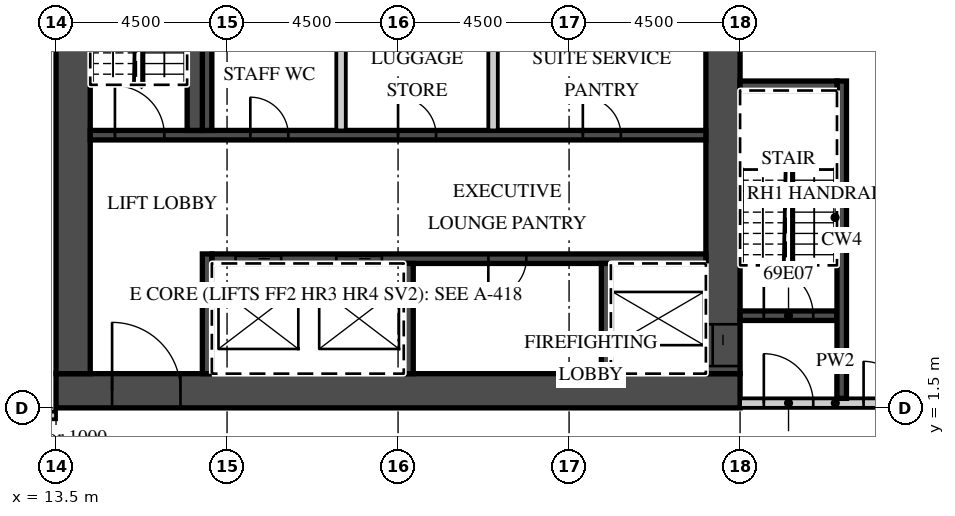
"""IFC4 building model, lengths in metres.
Left out: names, types, materials, properties, quantities, classifications, styles, units other than length and angle.
Written with IfcOpenShell. Run it as: python <this file> out.ifc"""

import sys

from ifc_helpers import new_model, si_unit, direction, frame, frame_2d, origin, place, context, subcontext, project, spatial, rectangle, extrude, element, fill, save


model = new_model("IFC4")
c1 = context("Model", 3, precision=1e-05, world=origin(), true_north=direction((0.0, 1.0)))
c2 = subcontext(c1, "Body", "Model", "MODEL_VIEW")
j1 = project(units=[si_unit("LENGTHUNIT", "METRE"), si_unit("PLANEANGLEUNIT", "RADIAN")], contexts=[c1])
p1 = place(None, origin())
s1 = spatial("IfcSite", under=j1, at=p1, CompositionType="ELEMENT")
p2 = place(p1, origin())
s2 = spatial("IfcBuilding", under=s1, at=p2, CompositionType="ELEMENT")
p3 = place(p2, frame((0.0, 0.0, 278.4)))
s3 = spatial("IfcBuildingStorey", under=s2, at=p3, CompositionType="ELEMENT", Elevation=278.4)
p4 = place(p3, frame((38.132, -12.858, 0.0), z_axis=(0.0, 0.0, 1.0), x_axis=(-0.095847749461, 0.995396006082, 0.0)))
e1 = element("IfcWall", 1, at=p4, inside=s3, PredefinedType="SOLIDWALL", context=c2, shape_type="SweptSolid", body=[
    extrude(rectangle(XDim=32.0, YDim=0.45, at=frame_2d((16.0, 0.0))), origin(), (0.0, 0.0, 1.0), 3.02),
])
p5 = place(p3, frame((-39.909, 1.3, 0.0), z_axis=(0.0, 0.0, 1.0), x_axis=(1.0, 0.0, 0.0)))
e2 = element("IfcWall", 2, at=p5, inside=s3, PredefinedType="PARTITIONING", context=c2, shape_type="SweptSolid", body=[
    extrude(rectangle(XDim=53.409, YDim=0.2, at=frame_2d((26.705, 0.0))), origin(), (0.0, 0.0, 1.0), 3.02),
])
p6 = place(p5, frame((0.15, 0.0, 0.0)))
e3 = element("IfcOpeningElement", 3, at=p6, cuts=e2, PredefinedType="OPENING", context=c2, shape_type="SweptSolid", body=[
    extrude(rectangle(XDim=0.9, YDim=2.1, at=frame_2d((0.45, 1.05))), frame((0.0, 0.11, 0.0), z_axis=(0.0, -1.0, 0.0), x_axis=(1.0, 0.0, 0.0)), (0.0, 0.0, 1.0), 0.22),
])
p7 = place(p5, frame((6.347, 0.0, 0.0)))
e4 = element("IfcOpeningElement", 4, at=p7, cuts=e2, PredefinedType="OPENING", context=c2, shape_type="SweptSolid", body=[
    extrude(rectangle(XDim=1.2, YDim=2.1, at=frame_2d((0.6, 1.05))), frame((0.0, 0.11, 0.0), z_axis=(0.0, -1.0, 0.0), x_axis=(1.0, 0.0, 0.0)), (0.0, 0.0, 1.0), 0.22),
])
p8 = place(p5, frame((15.347, 0.0, 0.0)))
e5 = element("IfcOpeningElement", 5, at=p8, cuts=e2, PredefinedType="OPENING", context=c2, shape_type="SweptSolid", body=[
    extrude(rectangle(XDim=1.2, YDim=2.1, at=frame_2d((0.6, 1.05))), frame((0.0, 0.11, 0.0), z_axis=(0.0, -1.0, 0.0), x_axis=(1.0, 0.0, 0.0)), (0.0, 0.0, 1.0), 0.22),
])
p9 = place(p5, frame((24.346, 0.0, 0.0)))
e6 = element("IfcOpeningElement", 6, at=p9, cuts=e2, PredefinedType="OPENING", context=c2, shape_type="SweptSolid", body=[
    extrude(rectangle(XDim=1.2, YDim=2.1, at=frame_2d((0.6, 1.05))), frame((0.0, 0.11, 0.0), z_axis=(0.0, -1.0, 0.0), x_axis=(1.0, 0.0, 0.0)), (0.0, 0.0, 1.0), 0.22),
])
p10 = place(p5, frame((33.346, 0.0, 0.0)))
e7 = element("IfcOpeningElement", 7, at=p10, cuts=e2, PredefinedType="OPENING", context=c2, shape_type="SweptSolid", body=[
    extrude(rectangle(XDim=1.2, YDim=2.1, at=frame_2d((0.6, 1.05))), frame((0.0, 0.11, 0.0), z_axis=(0.0, -1.0, 0.0), x_axis=(1.0, 0.0, 0.0)), (0.0, 0.0, 1.0), 0.22),
])
p11 = place(p5, frame((42.346, 0.0, 0.0)))
e8 = element("IfcOpeningElement", 8, at=p11, cuts=e2, PredefinedType="OPENING", context=c2, shape_type="SweptSolid", body=[
    extrude(rectangle(XDim=1.2, YDim=2.1, at=frame_2d((0.6, 1.05))), frame((0.0, 0.11, 0.0), z_axis=(0.0, -1.0, 0.0), x_axis=(1.0, 0.0, 0.0)), (0.0, 0.0, 1.0), 0.22),
])
p12 = place(p5, frame((51.834, 0.0, 0.0)))
e9 = element("IfcOpeningElement", 9, at=p12, cuts=e2, PredefinedType="OPENING", context=c2, shape_type="SweptSolid", body=[
    extrude(rectangle(XDim=1.0, YDim=2.1, at=frame_2d((0.5, 1.05))), frame((0.0, 0.11, 0.0), z_axis=(0.0, -1.0, 0.0), x_axis=(1.0, 0.0, 0.0)), (0.0, 0.0, 1.0), 0.22),
])
p13 = place(p3, frame((13.5, 1.95, 0.0), z_axis=(0.0, 0.0, 1.0), x_axis=(1.0, 0.0, 0.0)))
e10 = element("IfcWall", 10, at=p13, inside=s3, PredefinedType="SHEAR", context=c2, shape_type="SweptSolid", body=[
    extrude(rectangle(XDim=18.0, YDim=0.9, at=frame_2d((9.0, 0.0))), origin(), (0.0, 0.0, 1.0), 3.02),
])
p14 = place(p13, frame((1.475, 0.0, 0.0)))
e11 = element("IfcOpeningElement", 11, at=p14, cuts=e10, PredefinedType="OPENING", context=c2, shape_type="SweptSolid", body=[
    extrude(rectangle(XDim=1.8, YDim=2.1, at=frame_2d((0.9, 1.05))), frame((0.0, 0.46, 0.0), z_axis=(0.0, -1.0, 0.0), x_axis=(1.0, 0.0, 0.0)), (0.0, 0.0, 1.0), 0.92),
])
p15 = place(p3, frame((31.05, 2.4, 0.0), z_axis=(0.0, 0.0, 1.0), x_axis=(0.0, 1.0, 0.0)))
e12 = element("IfcWall", 12, at=p15, inside=s3, PredefinedType="SHEAR", context=c2, shape_type="SweptSolid", body=[
    extrude(rectangle(XDim=12.8, YDim=0.9, at=frame_2d((6.4, 0.0))), origin(), (0.0, 0.0, 1.0), 3.02),
])
p16 = place(p15, frame((0.2, 0.0, 0.0)))
e13 = element("IfcOpeningElement", 13, at=p16, cuts=e12, PredefinedType="OPENING", context=c2, shape_type="SweptSolid", body=[
    extrude(rectangle(XDim=1.1, YDim=2.1, at=frame_2d((0.55, 1.05))), frame((0.0, 0.46, 0.0), z_axis=(0.0, -1.0, 0.0), x_axis=(1.0, 0.0, 0.0)), (0.0, 0.0, 1.0), 0.92),
])
p17 = place(p3, frame((13.95, 2.4, 0.0), z_axis=(0.0, 0.0, 1.0), x_axis=(0.0, 1.0, 0.0)))
e14 = element("IfcWall", 14, at=p17, inside=s3, PredefinedType="SHEAR", context=c2, shape_type="SweptSolid", body=[
    extrude(rectangle(XDim=12.2, YDim=0.9, at=frame_2d((6.1, 0.0))), origin(), (0.0, 0.0, 1.0), 3.02),
])
p18 = place(p3, frame((17.6, 5.425, 0.0), z_axis=(0.0, 0.0, 1.0), x_axis=(1.0, 0.0, 0.0)))
e15 = element("IfcWall", 15, at=p18, inside=s3, PredefinedType="SHEAR", context=c2, shape_type="SweptSolid", body=[
    extrude(rectangle(XDim=13.0, YDim=0.25, at=frame_2d((6.5, 0.0))), origin(), (0.0, 0.0, 1.0), 3.02),
])
p19 = place(p18, frame((3.275, 0.0, 0.0)))
e16 = element("IfcOpeningElement", 16, at=p19, cuts=e15, PredefinedType="OPENING", context=c2, shape_type="SweptSolid", body=[
    extrude(rectangle(XDim=1.2, YDim=2.1, at=frame_2d((0.6, 1.05))), frame((0.0, 0.135, 0.0), z_axis=(0.0, -1.0, 0.0), x_axis=(1.0, 0.0, 0.0)), (0.0, 0.0, 1.0), 0.27),
])
p20 = place(p18, frame((0.625, 0.0, 0.0)))
e17 = element("IfcOpeningElement", 17, at=p20, cuts=e15, PredefinedType="OPENING", context=c2, shape_type="SweptSolid", body=[
    extrude(rectangle(XDim=1.2, YDim=2.1, at=frame_2d((0.6, 1.05))), frame((0.0, 0.135, 0.0), z_axis=(0.0, -1.0, 0.0), x_axis=(1.0, 0.0, 0.0)), (0.0, 0.0, 1.0), 0.27),
])
p21 = place(p18, frame((7.275, 0.0, 0.0)))
e18 = element("IfcOpeningElement", 18, at=p21, cuts=e15, PredefinedType="OPENING", context=c2, shape_type="SweptSolid", body=[
    extrude(rectangle(XDim=1.0, YDim=2.1, at=frame_2d((0.5, 1.05))), frame((0.0, 0.135, 0.0), z_axis=(0.0, -1.0, 0.0), x_axis=(1.0, 0.0, 0.0)), (0.0, 0.0, 1.0), 0.27),
])
p22 = place(p3, frame((17.475, 2.4, 0.0), z_axis=(0.0, 0.0, 1.0), x_axis=(0.0, 1.0, 0.0)))
e19 = element("IfcWall", 19, at=p22, inside=s3, PredefinedType="SHEAR", context=c2, shape_type="SweptSolid", body=[
    extrude(rectangle(XDim=3.15, YDim=0.25, at=frame_2d((1.575, 0.0))), origin(), (0.0, 0.0, 1.0), 3.02),
])
for number, where, z_axis, x_axis in (
    (20, (27.975, 2.4, 0.0), (0.0, 0.0, 1.0), (0.0, 1.0, 0.0)),
    (21, (22.775, 2.4, 0.0), (0.0, 0.0, 1.0), (0.0, 1.0, 0.0)),
):
    element("IfcWall", number, at=place(p3, frame(where, z_axis=z_axis, x_axis=x_axis)), inside=s3, PredefinedType="SHEAR", context=c2, shape_type="SweptSolid", body=[
        extrude(rectangle(XDim=2.9, YDim=0.25, at=frame_2d((1.45, 0.0))), origin(), (0.0, 0.0, 1.0), 3.02),
    ])
p23 = place(p3, frame((14.4, 8.675, 0.0), z_axis=(0.0, 0.0, 1.0), x_axis=(1.0, 0.0, 0.0)))
e22 = element("IfcWall", 22, at=p23, inside=s3, PredefinedType="SHEAR", context=c2, shape_type="SweptSolid", body=[
    extrude(rectangle(XDim=16.2, YDim=0.25, at=frame_2d((8.1, 0.0))), origin(), (0.0, 0.0, 1.0), 3.02),
])
p24 = place(p23, frame((0.65, 0.0, 0.0)))
e23 = element("IfcOpeningElement", 23, at=p24, cuts=e22, PredefinedType="OPENING", context=c2, shape_type="SweptSolid", body=[
    extrude(rectangle(XDim=1.3, YDim=2.1, at=frame_2d((0.65, 1.05))), frame((0.0, 0.135, 0.0), z_axis=(0.0, -1.0, 0.0), x_axis=(1.0, 0.0, 0.0)), (0.0, 0.0, 1.0), 0.27),
])
p25 = place(p23, frame((12.962, 0.0, 0.0)))
e24 = element("IfcOpeningElement", 24, at=p25, cuts=e22, PredefinedType="OPENING", context=c2, shape_type="SweptSolid", body=[
    extrude(rectangle(XDim=1.0, YDim=2.1, at=frame_2d((0.5, 1.05))), frame((0.0, 0.135, 0.0), z_axis=(0.0, -1.0, 0.0), x_axis=(1.0, 0.0, 0.0)), (0.0, 0.0, 1.0), 0.27),
])
p26 = place(p23, frame((8.1, 0.0, 0.0)))
e25 = element("IfcOpeningElement", 25, at=p26, cuts=e22, PredefinedType="OPENING", context=c2, shape_type="SweptSolid", body=[
    extrude(rectangle(XDim=1.0, YDim=2.1, at=frame_2d((0.5, 1.05))), frame((0.0, 0.135, 0.0), z_axis=(0.0, -1.0, 0.0), x_axis=(1.0, 0.0, 0.0)), (0.0, 0.0, 1.0), 0.27),
])
p27 = place(p23, frame((4.212, 0.0, 0.0)))
e26 = element("IfcOpeningElement", 26, at=p27, cuts=e22, PredefinedType="OPENING", context=c2, shape_type="SweptSolid", body=[
    extrude(rectangle(XDim=1.0, YDim=2.1, at=frame_2d((0.5, 1.05))), frame((0.0, 0.135, 0.0), z_axis=(0.0, -1.0, 0.0), x_axis=(1.0, 0.0, 0.0)), (0.0, 0.0, 1.0), 0.27),
])
p28 = place(p3, frame((17.475, 8.8, 0.0), z_axis=(0.0, 0.0, 1.0), x_axis=(0.0, 1.0, 0.0)))
e27 = element("IfcWall", 27, at=p28, inside=s3, PredefinedType="SHEAR", context=c2, shape_type="SweptSolid", body=[
    extrude(rectangle(XDim=2.9, YDim=0.25, at=frame_2d((1.45, 0.0))), origin(), (0.0, 0.0, 1.0), 3.02),
])
for number, where, z_axis, x_axis in (
    (28, (25.0, 8.8, 0.0), (0.0, 0.0, 1.0), (0.0, 1.0, 0.0)),
    (29, (21.0, 8.8, 0.0), (0.0, 0.0, 1.0), (0.0, 1.0, 0.0)),
):
    element("IfcWall", number, at=place(p3, frame(where, z_axis=z_axis, x_axis=x_axis)), inside=s3, PredefinedType="PARTITIONING", context=c2, shape_type="SweptSolid", body=[
        extrude(rectangle(XDim=2.9, YDim=0.25, at=frame_2d((1.45, 0.0))), origin(), (0.0, 0.0, 1.0), 3.02),
    ])
p29 = place(p3, frame((17.15, 8.8, 0.0), z_axis=(0.0, 0.0, 1.0), x_axis=(0.0, 1.0, 0.0)))
e30 = element("IfcWall", 30, at=p29, inside=s3, PredefinedType="SHEAR", context=c2, shape_type="SweptSolid", body=[
    extrude(rectangle(XDim=5.8, YDim=0.4, at=frame_2d((2.9, 0.0))), origin(), (0.0, 0.0, 1.0), 3.02),
])
p30 = place(p3, frame((31.5, 1.625, 0.0), z_axis=(0.0, 0.0, 1.0), x_axis=(1.0, 0.0, 0.0)))
e31 = element("IfcWall", 31, at=p30, inside=s3, PredefinedType="PARTITIONING", context=c2, shape_type="SweptSolid", body=[
    extrude(rectangle(XDim=5.012, YDim=0.25, at=frame_2d((2.506, 0.0))), origin(), (0.0, 0.0, 1.0), 3.02),
])
p31 = place(p30, frame((0.625, 0.0, 0.0)))
e32 = element("IfcOpeningElement", 32, at=p31, cuts=e31, PredefinedType="OPENING", context=c2, shape_type="SweptSolid", body=[
    extrude(rectangle(XDim=1.3, YDim=2.1, at=frame_2d((0.65, 1.05))), frame((0.0, 0.135, 0.0), z_axis=(0.0, -1.0, 0.0), x_axis=(1.0, 0.0, 0.0)), (0.0, 0.0, 1.0), 0.27),
])
p32 = place(p30, frame((3.25, 0.0, 0.0)))
e33 = element("IfcOpeningElement", 33, at=p32, cuts=e31, PredefinedType="OPENING", context=c2, shape_type="SweptSolid", body=[
    extrude(rectangle(XDim=1.1, YDim=2.1, at=frame_2d((0.55, 1.05))), frame((0.0, 0.135, 0.0), z_axis=(0.0, -1.0, 0.0), x_axis=(1.0, 0.0, 0.0)), (0.0, 0.0, 1.0), 0.27),
])
p33 = place(p3, frame((31.5, 3.925, 0.0), z_axis=(0.0, 0.0, 1.0), x_axis=(1.0, 0.0, 0.0)))
e34 = element("IfcWall", 34, at=p33, inside=s3, PredefinedType="SHEAR", context=c2, shape_type="SweptSolid", body=[
    extrude(rectangle(XDim=2.55, YDim=0.25, at=frame_2d((1.275, 0.0))), origin(), (0.0, 0.0, 1.0), 3.02),
])
p34 = place(p33, frame((0.625, 0.0, 0.0)))
e35 = element("IfcOpeningElement", 35, at=p34, cuts=e34, PredefinedType="OPENING", context=c2, shape_type="SweptSolid", body=[
    extrude(rectangle(XDim=1.3, YDim=2.1, at=frame_2d((0.65, 1.05))), frame((0.0, 0.135, 0.0), z_axis=(0.0, -1.0, 0.0), x_axis=(1.0, 0.0, 0.0)), (0.0, 0.0, 1.0), 0.27),
])
p35 = place(p3, frame((34.175, 1.75, 0.0), z_axis=(0.0, 0.0, 1.0), x_axis=(0.0, 1.0, 0.0)))
e36 = element("IfcWall", 36, at=p35, inside=s3, PredefinedType="SHEAR", context=c2, shape_type="SweptSolid", body=[
    extrude(rectangle(XDim=8.35, YDim=0.25, at=frame_2d((4.175, 0.0))), origin(), (0.0, 0.0, 1.0), 3.02),
])
p36 = place(p3, frame((31.5, 9.975, 0.0), z_axis=(0.0, 0.0, 1.0), x_axis=(1.0, 0.0, 0.0)))
e37 = element("IfcWall", 37, at=p36, inside=s3, PredefinedType="SHEAR", context=c2, shape_type="SweptSolid", body=[
    extrude(rectangle(XDim=2.55, YDim=0.25, at=frame_2d((1.275, 0.0))), origin(), (0.0, 0.0, 1.0), 3.02),
])
p37 = place(p19, origin())
e38 = element("IfcDoor", 38, at=p37, inside=s3, OperationType="SLIDING_TO_RIGHT", PredefinedType="DOOR", context=c2, shape_type="SweptSolid", body=[
    extrude(rectangle(XDim=1.2, YDim=2.1, at=frame_2d((0.6, 1.05))), frame((0.0, 0.025, 0.0), z_axis=(0.0, -1.0, 0.0), x_axis=(1.0, 0.0, 0.0)), (0.0, 0.0, 1.0), 0.05),
])
fill(e16, e38)
p38 = place(p20, origin())
e39 = element("IfcDoor", 39, at=p38, inside=s3, OperationType="SLIDING_TO_LEFT", PredefinedType="DOOR", context=c2, shape_type="SweptSolid", body=[
    extrude(rectangle(XDim=1.2, YDim=2.1, at=frame_2d((0.6, 1.05))), frame((0.0, 0.025, 0.0), z_axis=(0.0, -1.0, 0.0), x_axis=(1.0, 0.0, 0.0)), (0.0, 0.0, 1.0), 0.05),
])
fill(e17, e39)
p39 = place(p16, origin())
e40 = element("IfcDoor", 40, at=p39, inside=s3, OperationType="SLIDING_TO_LEFT", PredefinedType="DOOR", context=c2, shape_type="SweptSolid", body=[
    extrude(rectangle(XDim=1.1, YDim=2.1, at=frame_2d((0.55, 1.05))), frame((0.0, 0.025, 0.0), z_axis=(0.0, -1.0, 0.0), x_axis=(1.0, 0.0, 0.0)), (0.0, 0.0, 1.0), 0.05),
])
fill(e13, e40)
p40 = place(p14, origin())
e41 = element("IfcDoor", 41, at=p40, inside=s3, OperationType="DOUBLE_DOOR_DOUBLE_SWING", PredefinedType="DOOR", context=c2, shape_type="SweptSolid", body=[
    extrude(rectangle(XDim=1.8, YDim=2.1, at=frame_2d((0.9, 1.05))), frame((0.0, 0.025, 0.0), z_axis=(0.0, -1.0, 0.0), x_axis=(1.0, 0.0, 0.0)), (0.0, 0.0, 1.0), 0.05),
])
fill(e11, e41)
p41 = place(p31, origin())
e42 = element("IfcDoor", 42, at=p41, inside=s3, OperationType="SINGLE_SWING_LEFT", PredefinedType="DOOR", context=c2, shape_type="SweptSolid", body=[
    extrude(rectangle(XDim=1.3, YDim=2.1, at=frame_2d((0.65, 1.05))), frame((0.0, 0.025, 0.0), z_axis=(0.0, -1.0, 0.0), x_axis=(1.0, 0.0, 0.0)), (0.0, 0.0, 1.0), 0.05),
])
fill(e32, e42)
p42 = place(p34, origin())
e43 = element("IfcDoor", 43, at=p42, inside=s3, OperationType="SINGLE_SWING_LEFT", PredefinedType="DOOR", context=c2, shape_type="SweptSolid", body=[
    extrude(rectangle(XDim=1.3, YDim=2.1, at=frame_2d((0.65, 1.05))), frame((0.0, 0.025, 0.0), z_axis=(0.0, -1.0, 0.0), x_axis=(1.0, 0.0, 0.0)), (0.0, 0.0, 1.0), 0.05),
])
fill(e35, e43)
p43 = place(p32, origin())
e44 = element("IfcDoor", 44, at=p43, inside=s3, OperationType="SINGLE_SWING_LEFT", PredefinedType="DOOR", context=c2, shape_type="SweptSolid", body=[
    extrude(rectangle(XDim=1.1, YDim=2.1, at=frame_2d((0.55, 1.05))), frame((0.0, 0.025, 0.0), z_axis=(0.0, -1.0, 0.0), x_axis=(1.0, 0.0, 0.0)), (0.0, 0.0, 1.0), 0.05),
])
fill(e33, e44)
p44 = place(p24, origin())
e45 = element("IfcDoor", 45, at=p44, inside=s3, OperationType="SINGLE_SWING_LEFT", PredefinedType="DOOR", context=c2, shape_type="SweptSolid", body=[
    extrude(rectangle(XDim=1.3, YDim=2.1, at=frame_2d((0.65, 1.05))), frame((0.0, 0.025, 0.0), z_axis=(0.0, -1.0, 0.0), x_axis=(1.0, 0.0, 0.0)), (0.0, 0.0, 1.0), 0.05),
])
fill(e23, e45)
p45 = place(p25, origin())
e46 = element("IfcDoor", 46, at=p45, inside=s3, OperationType="SINGLE_SWING_LEFT", PredefinedType="DOOR", context=c2, shape_type="SweptSolid", body=[
    extrude(rectangle(XDim=1.0, YDim=2.1, at=frame_2d((0.5, 1.05))), frame((0.0, 0.025, 0.0), z_axis=(0.0, -1.0, 0.0), x_axis=(1.0, 0.0, 0.0)), (0.0, 0.0, 1.0), 0.05),
])
fill(e24, e46)
p46 = place(p26, origin())
e47 = element("IfcDoor", 47, at=p46, inside=s3, OperationType="SINGLE_SWING_LEFT", PredefinedType="DOOR", context=c2, shape_type="SweptSolid", body=[
    extrude(rectangle(XDim=1.0, YDim=2.1, at=frame_2d((0.5, 1.05))), frame((0.0, 0.025, 0.0), z_axis=(0.0, -1.0, 0.0), x_axis=(1.0, 0.0, 0.0)), (0.0, 0.0, 1.0), 0.05),
])
fill(e25, e47)
p47 = place(p27, origin())
e48 = element("IfcDoor", 48, at=p47, inside=s3, OperationType="SINGLE_SWING_LEFT", PredefinedType="DOOR", context=c2, shape_type="SweptSolid", body=[
    extrude(rectangle(XDim=1.0, YDim=2.1, at=frame_2d((0.5, 1.05))), frame((0.0, 0.025, 0.0), z_axis=(0.0, -1.0, 0.0), x_axis=(1.0, 0.0, 0.0)), (0.0, 0.0, 1.0), 0.05),
])
fill(e26, e48)
p48 = place(p21, origin())
e49 = element("IfcDoor", 49, at=p48, inside=s3, OperationType="SINGLE_SWING_LEFT", PredefinedType="DOOR", context=c2, shape_type="SweptSolid", body=[
    extrude(rectangle(XDim=1.0, YDim=2.1, at=frame_2d((0.5, 1.05))), frame((0.0, 0.025, 0.0), z_axis=(0.0, -1.0, 0.0), x_axis=(1.0, 0.0, 0.0)), (0.0, 0.0, 1.0), 0.05),
])
fill(e18, e49)
save(model, sys.argv[1])
